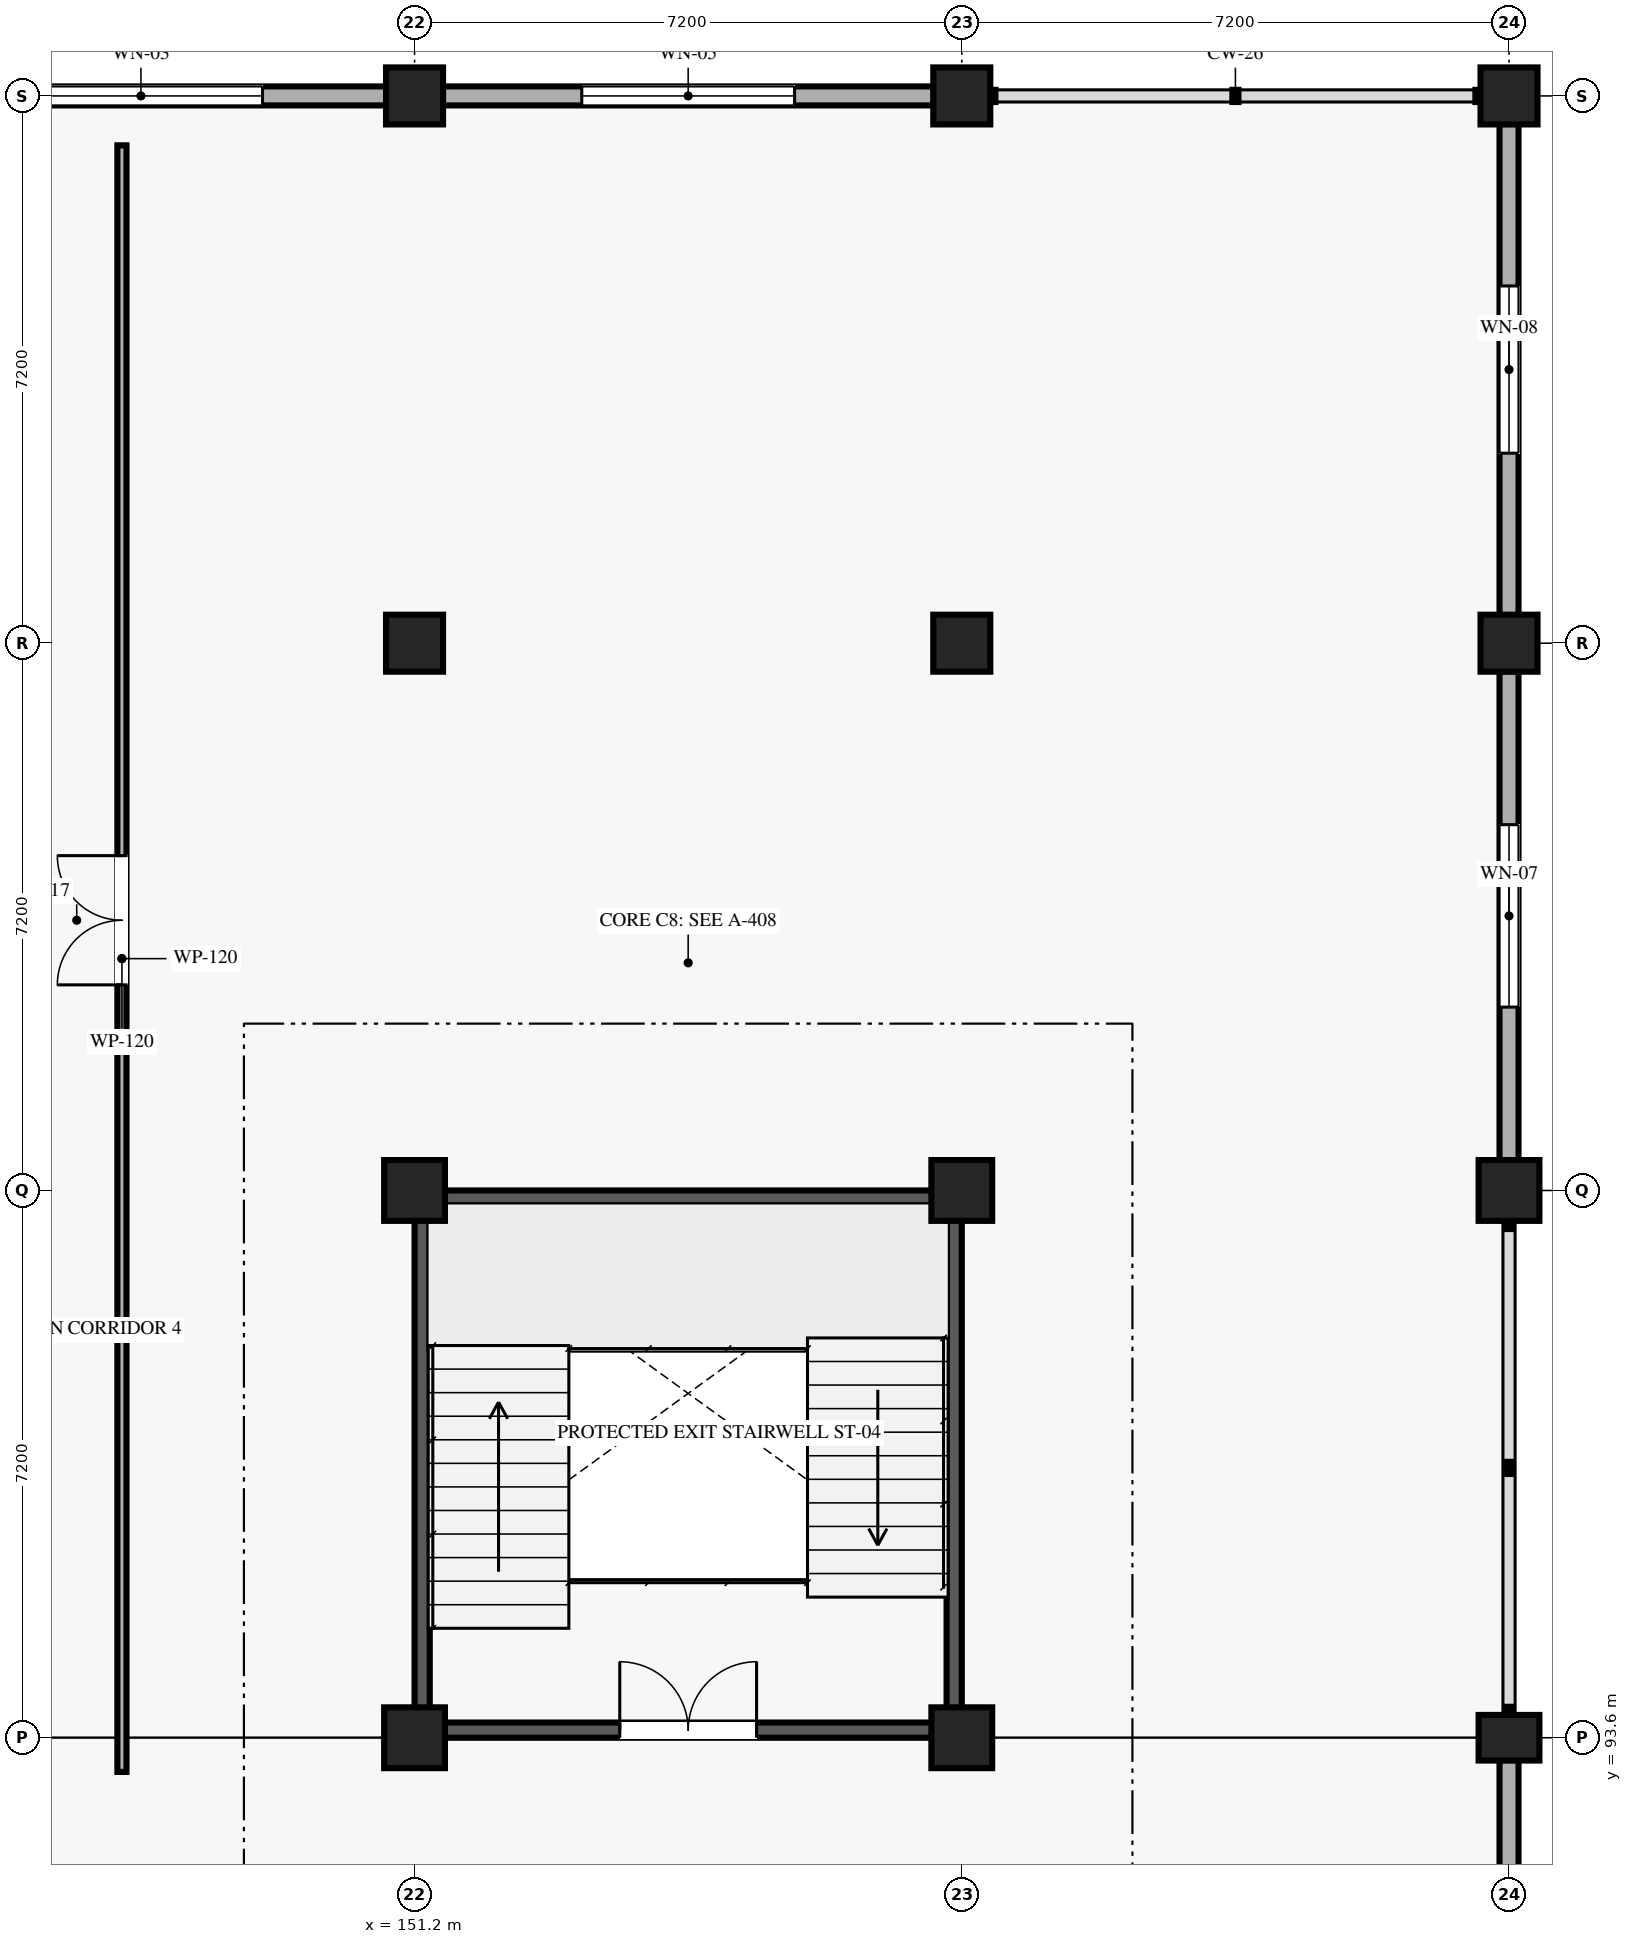
"""IFC4 building model, lengths in metres.
Left out: names, types, materials, properties, quantities, classifications, styles, units other than length and angle.
Written with IfcOpenShell. Run it as: python <this file> out.ifc"""

import sys

from ifc_helpers import new_model, si_unit, direction, frame, frame_2d, origin, origin_2d, place, context, subcontext, project, spatial, rectangle, extrude, element, fill, save


model = new_model("IFC4")
c1 = context("Model", 3, precision=1e-05, world=origin(), true_north=direction((0.0, 1.0)))
c2 = subcontext(c1, "Body", "Model", "MODEL_VIEW")
j1 = project(units=[si_unit("LENGTHUNIT", "METRE"), si_unit("PLANEANGLEUNIT", "RADIAN")], contexts=[c1])
p1 = place(None, origin())
s1 = spatial("IfcSite", under=j1, at=p1, CompositionType="ELEMENT")
p2 = place(p1, origin())
s2 = spatial("IfcBuilding", under=s1, at=p2, CompositionType="ELEMENT")
p3 = place(p2, frame((0.0, 0.0, 5.4)))
s3 = spatial("IfcBuildingStorey", under=s2, at=p3, CompositionType="ELEMENT", Elevation=5.4)
for number, where, z_axis, x_axis in (
    (1, (151.2, 93.6, 0.0), (0.0, 0.0, 1.0), (1.0, 0.0, 0.0)),
    (2, (151.2, 100.8, 0.0), (0.0, 0.0, 1.0), (1.0, 0.0, 0.0)),
):
    element("IfcColumn", number, at=place(p3, frame(where, z_axis=z_axis, x_axis=x_axis)), inside=s3, PredefinedType="COLUMN", context=c2, shape_type="SweptSolid", body=[
        extrude(rectangle(XDim=0.8, YDim=0.8, at=origin_2d()), origin(), (0.0, 0.0, 1.0), 4.05),
    ])
for number, where, z_axis, x_axis in (
    (3, (151.2, 108.0, 0.0), (0.0, 0.0, 1.0), (1.0, 0.0, 0.0)),
    (4, (151.2, 115.2, 0.0), (0.0, 0.0, 1.0), (1.0, 0.0, 0.0)),
):
    element("IfcColumn", number, at=place(p3, frame(where, z_axis=z_axis, x_axis=x_axis)), inside=s3, PredefinedType="COLUMN", context=c2, shape_type="SweptSolid", body=[
        extrude(rectangle(XDim=0.75, YDim=0.75, at=origin_2d()), origin(), (0.0, 0.0, 1.0), 4.05),
    ])
for number, where, z_axis, x_axis in (
    (5, (158.4, 93.6, 0.0), (0.0, 0.0, 1.0), (1.0, 0.0, 0.0)),
    (6, (158.4, 100.8, 0.0), (0.0, 0.0, 1.0), (1.0, 0.0, 0.0)),
):
    element("IfcColumn", number, at=place(p3, frame(where, z_axis=z_axis, x_axis=x_axis)), inside=s3, PredefinedType="COLUMN", context=c2, shape_type="SweptSolid", body=[
        extrude(rectangle(XDim=0.8, YDim=0.8, at=origin_2d()), origin(), (0.0, 0.0, 1.0), 4.05),
    ])
for number, where, z_axis, x_axis in (
    (7, (158.4, 108.0, 0.0), (0.0, 0.0, 1.0), (1.0, 0.0, 0.0)),
    (8, (158.4, 115.2, 0.0), (0.0, 0.0, 1.0), (1.0, 0.0, 0.0)),
):
    element("IfcColumn", number, at=place(p3, frame(where, z_axis=z_axis, x_axis=x_axis)), inside=s3, PredefinedType="COLUMN", context=c2, shape_type="SweptSolid", body=[
        extrude(rectangle(XDim=0.75, YDim=0.75, at=origin_2d()), origin(), (0.0, 0.0, 1.0), 4.05),
    ])
p4 = place(p3, frame((165.6, 93.6, 0.0), z_axis=(0.0, 0.0, 1.0), x_axis=(0.0, 1.0, 0.0)))
e9 = element("IfcColumn", 9, at=p4, inside=s3, PredefinedType="COLUMN", context=c2, shape_type="SweptSolid", body=[
    extrude(rectangle(XDim=0.6, YDim=0.8, at=origin_2d()), origin(), (0.0, 0.0, 1.0), 4.05),
])
p5 = place(p3, frame((165.6, 100.8, 0.0), z_axis=(0.0, 0.0, 1.0), x_axis=(1.0, 0.0, 0.0)))
e10 = element("IfcColumn", 10, at=p5, inside=s3, PredefinedType="COLUMN", context=c2, shape_type="SweptSolid", body=[
    extrude(rectangle(XDim=0.8, YDim=0.8, at=origin_2d()), origin(), (0.0, 0.0, 1.0), 4.05),
])
for number, where, z_axis, x_axis in (
    (11, (165.6, 108.0, 0.0), (0.0, 0.0, 1.0), (1.0, 0.0, 0.0)),
    (12, (165.6, 115.2, 0.0), (0.0, 0.0, 1.0), (1.0, 0.0, 0.0)),
):
    element("IfcColumn", number, at=place(p3, frame(where, z_axis=z_axis, x_axis=x_axis)), inside=s3, PredefinedType="COLUMN", context=c2, shape_type="SweptSolid", body=[
        extrude(rectangle(XDim=0.75, YDim=0.75, at=origin_2d()), origin(), (0.0, 0.0, 1.0), 4.05),
    ])
p6 = place(p3, frame((144.37, 115.2, 0.0), z_axis=(0.0, 0.0, 1.0), x_axis=(1.0, 0.0, 0.0)))
e13 = element("IfcWall", 13, at=p6, inside=s3, PredefinedType="SOLIDWALL", context=c2, shape_type="SweptSolid", body=[
    extrude(rectangle(XDim=6.46, YDim=0.25, at=frame_2d((3.23, 0.0))), origin(), (0.0, 0.0, 1.0), 3.195),
])
p7 = place(p6, frame((1.63, 0.0, 0.85)))
e14 = element("IfcOpeningElement", 14, at=p7, cuts=e13, PredefinedType="OPENING", context=c2, shape_type="SweptSolid", body=[
    extrude(rectangle(XDim=3.2, YDim=1.95, at=frame_2d((1.6, 0.975))), frame((0.0, 0.135, 0.0), z_axis=(0.0, -1.0, 0.0), x_axis=(1.0, 0.0, 0.0)), (0.0, 0.0, 1.0), 0.27),
])
p8 = place(p3, frame((151.57, 115.2, 0.0), z_axis=(0.0, 0.0, 1.0), x_axis=(1.0, 0.0, 0.0)))
e15 = element("IfcWall", 15, at=p8, inside=s3, PredefinedType="SOLIDWALL", context=c2, shape_type="SweptSolid", body=[
    extrude(rectangle(XDim=6.46, YDim=0.25, at=frame_2d((3.23, 0.0))), origin(), (0.0, 0.0, 1.0), 3.195),
])
p9 = place(p8, frame((1.83, 0.0, 0.85)))
e16 = element("IfcOpeningElement", 16, at=p9, cuts=e15, PredefinedType="OPENING", context=c2, shape_type="SweptSolid", body=[
    extrude(rectangle(XDim=2.8, YDim=1.85, at=frame_2d((1.4, 0.925))), frame((0.0, 0.135, 0.0), z_axis=(0.0, -1.0, 0.0), x_axis=(1.0, 0.0, 0.0)), (0.0, 0.0, 1.0), 0.27),
])
p10 = place(p3, frame((165.6, 86.695, 0.0), z_axis=(0.0, 0.0, 1.0), x_axis=(0.0, 1.0, 0.0)))
e17 = element("IfcWall", 17, at=p10, inside=s3, PredefinedType="SOLIDWALL", context=c2, shape_type="SweptSolid", body=[
    extrude(rectangle(XDim=6.61, YDim=0.25, at=frame_2d((3.305, 0.0))), origin(), (0.0, 0.0, 1.0), 3.195),
])
p11 = place(p10, frame((1.905, 0.0, 0.85)))
e18 = element("IfcOpeningElement", 18, at=p11, cuts=e17, PredefinedType="OPENING", context=c2, shape_type="SweptSolid", body=[
    extrude(rectangle(XDim=2.8, YDim=1.85, at=frame_2d((1.4, 0.925))), frame((0.0, 0.135, 0.0), z_axis=(0.0, -1.0, 0.0), x_axis=(1.0, 0.0, 0.0)), (0.0, 0.0, 1.0), 0.27),
])
p12 = place(p3, frame((165.6, 101.195, 0.0), z_axis=(0.0, 0.0, 1.0), x_axis=(0.0, 1.0, 0.0)))
e19 = element("IfcWall", 19, at=p12, inside=s3, PredefinedType="SOLIDWALL", context=c2, shape_type="SweptSolid", body=[
    extrude(rectangle(XDim=6.435, YDim=0.25, at=frame_2d((3.217, 0.0))), origin(), (0.0, 0.0, 1.0), 3.195),
])
p13 = place(p12, frame((2.018, 0.0, 0.85)))
e20 = element("IfcOpeningElement", 20, at=p13, cuts=e19, PredefinedType="OPENING", context=c2, shape_type="SweptSolid", body=[
    extrude(rectangle(XDim=2.4, YDim=1.75, at=frame_2d((1.2, 0.875))), frame((0.0, 0.135, 0.0), z_axis=(0.0, -1.0, 0.0), x_axis=(1.0, 0.0, 0.0)), (0.0, 0.0, 1.0), 0.27),
])
p14 = place(p3, frame((165.6, 108.37, 0.0), z_axis=(0.0, 0.0, 1.0), x_axis=(0.0, 1.0, 0.0)))
e21 = element("IfcWall", 21, at=p14, inside=s3, PredefinedType="SOLIDWALL", context=c2, shape_type="SweptSolid", body=[
    extrude(rectangle(XDim=6.46, YDim=0.25, at=frame_2d((3.23, 0.0))), origin(), (0.0, 0.0, 1.0), 3.195),
])
p15 = place(p14, frame((2.13, 0.0, 0.85)))
e22 = element("IfcOpeningElement", 22, at=p15, cuts=e21, PredefinedType="OPENING", context=c2, shape_type="SweptSolid", body=[
    extrude(rectangle(XDim=2.2, YDim=1.7, at=frame_2d((1.1, 0.85))), frame((0.0, 0.135, 0.0), z_axis=(0.0, -1.0, 0.0), x_axis=(1.0, 0.0, 0.0)), (0.0, 0.0, 1.0), 0.27),
])
p16 = place(p3, frame((151.4, 93.7, 0.0), z_axis=(0.0, 0.0, 1.0), x_axis=(1.0, 0.0, 0.0)))
e23 = element("IfcWall", 23, at=p16, inside=s3, PredefinedType="SHEAR", context=c2, shape_type="SweptSolid", body=[
    extrude(rectangle(XDim=6.8, YDim=0.2, at=frame_2d((3.4, 0.0))), origin(), (0.0, 0.0, 1.0), 3.81),
])
p17 = place(p16, frame((2.5, 0.0, 0.0)))
e24 = element("IfcOpeningElement", 24, at=p17, cuts=e23, PredefinedType="OPENING", context=c2, shape_type="SweptSolid", body=[
    extrude(rectangle(XDim=1.8, YDim=2.2, at=frame_2d((0.9, 1.1))), frame((0.0, 0.11, 0.0), z_axis=(0.0, -1.0, 0.0), x_axis=(1.0, 0.0, 0.0)), (0.0, 0.0, 1.0), 0.22),
])
for number, where, z_axis, x_axis in (
    (25, (151.4, 100.7, 0.0), (0.0, 0.0, 1.0), (1.0, 0.0, 0.0)),
    (26, (151.3, 93.8, 0.0), (0.0, 0.0, 1.0), (0.0, 1.0, 0.0)),
    (27, (158.3, 93.8, 0.0), (0.0, 0.0, 1.0), (0.0, 1.0, 0.0)),
):
    element("IfcWall", number, at=place(p3, frame(where, z_axis=z_axis, x_axis=x_axis)), inside=s3, PredefinedType="SHEAR", context=c2, shape_type="SweptSolid", body=[
        extrude(rectangle(XDim=6.8, YDim=0.2, at=frame_2d((3.4, 0.0))), origin(), (0.0, 0.0, 1.0), 3.81),
    ])
p18 = place(p3, frame((147.35, 93.15, 0.0), z_axis=(0.0, 0.0, 1.0), x_axis=(0.0, 1.0, 0.0)))
e28 = element("IfcWall", 28, at=p18, inside=s3, PredefinedType="PARTITIONING", context=c2, shape_type="SweptSolid", body=[
    extrude(rectangle(XDim=21.4, YDim=0.12, at=frame_2d((10.7, 0.0))), origin(), (0.0, 0.0, 1.0), 3.81),
])
p19 = place(p18, frame((10.355, 0.0, 0.0)))
e29 = element("IfcOpeningElement", 29, at=p19, cuts=e28, PredefinedType="OPENING", context=c2, shape_type="SweptSolid", body=[
    extrude(rectangle(XDim=1.7, YDim=2.2, at=frame_2d((0.85, 1.1))), frame((0.0, 0.07, 0.0), z_axis=(0.0, -1.0, 0.0), x_axis=(1.0, 0.0, 0.0)), (0.0, 0.0, 1.0), 0.14),
])
p20 = place(p7, origin())
e30 = element("IfcWindow", 30, at=p20, inside=s3, PartitioningType="SINGLE_PANEL", PredefinedType="WINDOW", context=c2, shape_type="SweptSolid", body=[
    extrude(rectangle(XDim=3.2, YDim=1.95, at=frame_2d((1.6, 0.975))), frame((0.0, 0.03, 0.0), z_axis=(0.0, -1.0, 0.0), x_axis=(1.0, 0.0, 0.0)), (0.0, 0.0, 1.0), 0.06),
])
fill(e14, e30)
p21 = place(p9, origin())
e31 = element("IfcWindow", 31, at=p21, inside=s3, PartitioningType="SINGLE_PANEL", PredefinedType="WINDOW", context=c2, shape_type="SweptSolid", body=[
    extrude(rectangle(XDim=2.8, YDim=1.85, at=frame_2d((1.4, 0.925))), frame((0.0, 0.03, 0.0), z_axis=(0.0, -1.0, 0.0), x_axis=(1.0, 0.0, 0.0)), (0.0, 0.0, 1.0), 0.06),
])
fill(e16, e31)
p22 = place(p13, origin())
e32 = element("IfcWindow", 32, at=p22, inside=s3, PartitioningType="SINGLE_PANEL", PredefinedType="WINDOW", context=c2, shape_type="SweptSolid", body=[
    extrude(rectangle(XDim=2.4, YDim=1.75, at=frame_2d((1.2, 0.875))), frame((0.0, 0.03, 0.0), z_axis=(0.0, -1.0, 0.0), x_axis=(1.0, 0.0, 0.0)), (0.0, 0.0, 1.0), 0.06),
])
fill(e20, e32)
p23 = place(p15, origin())
e33 = element("IfcWindow", 33, at=p23, inside=s3, PartitioningType="SINGLE_PANEL", PredefinedType="WINDOW", context=c2, shape_type="SweptSolid", body=[
    extrude(rectangle(XDim=2.2, YDim=1.7, at=frame_2d((1.1, 0.85))), frame((0.0, 0.03, 0.0), z_axis=(0.0, -1.0, 0.0), x_axis=(1.0, 0.0, 0.0)), (0.0, 0.0, 1.0), 0.06),
])
fill(e22, e33)
p24 = place(p17, origin())
e34 = element("IfcDoor", 34, at=p24, inside=s3, OperationType="DOUBLE_DOOR_SINGLE_SWING", PredefinedType="DOOR", context=c2, shape_type="SweptSolid", body=[
    extrude(rectangle(XDim=1.8, YDim=2.2, at=frame_2d((0.9, 1.1))), frame((0.0, 0.025, 0.0), z_axis=(0.0, -1.0, 0.0), x_axis=(1.0, 0.0, 0.0)), (0.0, 0.0, 1.0), 0.05),
])
fill(e24, e34)
p25 = place(p19, origin())
e35 = element("IfcDoor", 35, at=p25, inside=s3, OperationType="DOUBLE_DOOR_SINGLE_SWING", PredefinedType="DOOR", context=c2, shape_type="SweptSolid", body=[
    extrude(rectangle(XDim=1.7, YDim=2.2, at=frame_2d((0.85, 1.1))), frame((0.0, 0.025, 0.0), z_axis=(0.0, -1.0, 0.0), x_axis=(1.0, 0.0, 0.0)), (0.0, 0.0, 1.0), 0.05),
])
fill(e29, e35)
save(model, sys.argv[1])
